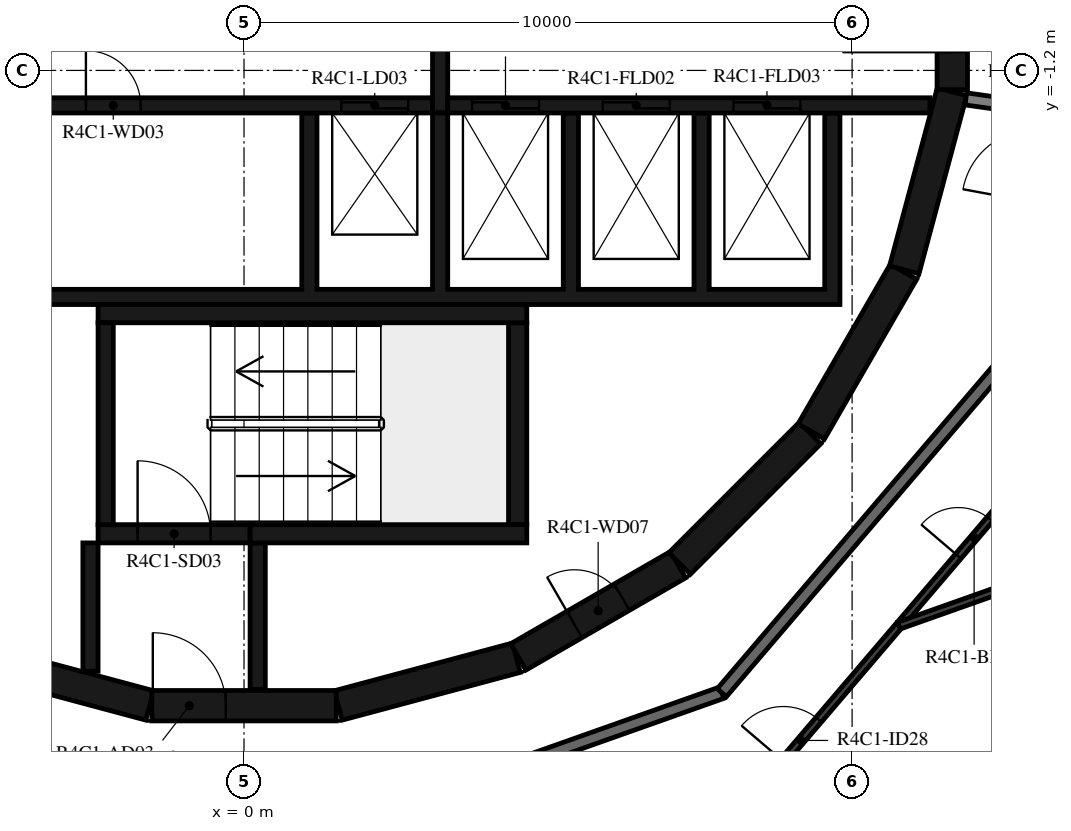
"""IFC4 building model, lengths in metres.
Left out: names, types, materials, properties, quantities, classifications, styles, units other than length and angle.
Written with IfcOpenShell. Run it as: python <this file> out.ifc"""

import sys

from ifc_helpers import new_model, si_unit, direction, frame, frame_2d, origin, place, context, subcontext, project, spatial, polyline, rectangle, outline, extrude, element, fill, save


model = new_model("IFC4")
c1 = context("Model", 3, precision=1e-05, world=origin(), true_north=direction((0.0, 1.0)))
c2 = subcontext(c1, "Body", "Model", "MODEL_VIEW")
j1 = project(units=[si_unit("LENGTHUNIT", "METRE"), si_unit("PLANEANGLEUNIT", "RADIAN")], contexts=[c1])
p1 = place(None, origin())
s1 = spatial("IfcSite", under=j1, at=p1, CompositionType="ELEMENT")
p2 = place(p1, origin())
s2 = spatial("IfcBuilding", under=s1, at=p2, CompositionType="ELEMENT")
p3 = place(p2, frame((0.0, 0.0, 176.2)))
s3 = spatial("IfcBuildingStorey", under=s2, at=p3, CompositionType="ELEMENT", Elevation=176.2)
p4 = place(p3, frame((1.55, -11.643, 0.0), z_axis=(0.0, 0.0, 1.0), x_axis=(0.965948410781, 0.258734743916, 0.0)))
e1 = element("IfcWall", 1, at=p4, inside=s3, PredefinedType="SHEAR", context=c2, shape_type="SweptSolid", body=[
    extrude(rectangle(XDim=3.033, YDim=0.5, at=frame_2d((1.516, 0.0))), origin(), (0.0, 0.0, 1.0), 3.12),
])
p5 = place(p3, frame((4.51, -10.845, 0.0), z_axis=(0.0, 0.0, 1.0), x_axis=(0.865975092491, 0.500087131594, 0.0)))
e2 = element("IfcWall", 2, at=p5, inside=s3, PredefinedType="SHEAR", context=c2, shape_type="SweptSolid", body=[
    extrude(rectangle(XDim=3.033, YDim=0.5, at=frame_2d((1.516, 0.0))), origin(), (0.0, 0.0, 1.0), 3.12),
])
p6 = place(p5, frame((1.066, 0.0, 0.0)))
e3 = element("IfcOpeningElement", 3, at=p6, cuts=e2, PredefinedType="OPENING", context=c2, shape_type="SweptSolid", body=[
    extrude(rectangle(XDim=0.9, YDim=2.1, at=frame_2d((0.45, 1.05))), frame((0.0, 0.26, 0.0), z_axis=(0.0, -1.0, 0.0), x_axis=(1.0, 0.0, 0.0)), (0.0, 0.0, 1.0), 0.52),
])
p7 = place(p3, frame((7.164, -9.308, 0.0), z_axis=(0.0, 0.0, 1.0), x_axis=(0.707106781187, 0.707106781187, 0.0)))
e4 = element("IfcWall", 4, at=p7, inside=s3, PredefinedType="SHEAR", context=c2, shape_type="SweptSolid", body=[
    extrude(rectangle(XDim=3.032, YDim=0.5, at=frame_2d((1.516, 0.0))), origin(), (0.0, 0.0, 1.0), 3.12),
])
for number, where, z_axis, x_axis in (
    (5, (9.329, -7.137, 0.0), (0.0, 0.0, 1.0), (0.5, 0.866, 0.0)),
    (6, (10.858, -4.479, 0.0), (0.0, 0.0, 1.0), (0.259, 0.966, 0.0)),
):
    element("IfcWall", number, at=place(p3, frame(where, z_axis=z_axis, x_axis=x_axis)), inside=s3, PredefinedType="SHEAR", context=c2, shape_type="SweptSolid", body=[
        extrude(rectangle(XDim=3.033, YDim=0.5, at=frame_2d((1.516, 0.0))), origin(), (0.0, 0.0, 1.0), 3.12),
    ])
p8 = place(p3, frame((11.647, -1.516, 0.0), z_axis=(0.0, 0.0, 1.0), x_axis=(0.0, 1.0, 0.0)))
e7 = element("IfcWall", 7, at=p8, inside=s3, PredefinedType="SHEAR", context=c2, shape_type="SweptSolid", body=[
    extrude(rectangle(XDim=3.033, YDim=0.5, at=frame_2d((1.516, 0.0))), origin(), (0.0, 0.0, 1.0), 3.12),
])
p9 = place(p8, frame((0.616, 0.0, 0.0)))
e8 = element("IfcOpeningElement", 8, at=p9, cuts=e7, PredefinedType="OPENING", context=c2, shape_type="SweptSolid", body=[
    extrude(rectangle(XDim=1.8, YDim=2.1, at=frame_2d((0.9, 1.05))), frame((0.0, 0.26, 0.0), z_axis=(0.0, -1.0, 0.0), x_axis=(1.0, 0.0, 0.0)), (0.0, 0.0, 1.0), 0.52),
])
p10 = place(p3, frame((-4.479, -10.858, 0.0), z_axis=(0.0, 0.0, 1.0), x_axis=(0.965948410781, -0.258734743916, 0.0)))
e9 = element("IfcWall", 9, at=p10, inside=s3, PredefinedType="SHEAR", context=c2, shape_type="SweptSolid", body=[
    extrude(rectangle(XDim=3.033, YDim=0.5, at=frame_2d((1.516, 0.0))), origin(), (0.0, 0.0, 1.0), 3.12),
])
p11 = place(p3, frame((-1.516, -11.647, 0.0), z_axis=(0.0, 0.0, 1.0), x_axis=(1.0, 0.0, 0.0)))
e10 = element("IfcWall", 10, at=p11, inside=s3, PredefinedType="SHEAR", context=c2, shape_type="SweptSolid", body=[
    extrude(rectangle(XDim=3.033, YDim=0.5, at=frame_2d((1.516, 0.0))), origin(), (0.0, 0.0, 1.0), 3.12),
])
p12 = place(p11, frame((0.016, 0.0, 0.0)))
e11 = element("IfcOpeningElement", 11, at=p12, cuts=e10, PredefinedType="OPENING", context=c2, shape_type="SweptSolid", body=[
    extrude(rectangle(XDim=1.2, YDim=2.1, at=frame_2d((0.6, 1.05))), frame((0.0, 0.26, 0.0), z_axis=(0.0, -1.0, 0.0), x_axis=(1.0, 0.0, 0.0)), (0.0, 0.0, 1.0), 0.52),
])
p13 = place(p3, frame((-2.275, -8.67, 0.0), z_axis=(0.0, 0.0, 1.0), x_axis=(0.0, 1.0, 0.0)))
e12 = element("IfcWall", 12, at=p13, inside=s3, PredefinedType="SHEAR", context=c2, shape_type="SweptSolid", body=[
    extrude(rectangle(XDim=3.32, YDim=0.25, at=frame_2d((1.66, 0.0))), origin(), (0.0, 0.0, 1.0), 3.12),
])
p14 = place(p3, frame((-2.4, -5.2, 0.0), z_axis=(0.0, 0.0, 1.0), x_axis=(1.0, 0.0, 0.0)))
e13 = element("IfcWall", 13, at=p14, inside=s3, PredefinedType="SHEAR", context=c2, shape_type="SweptSolid", body=[
    extrude(rectangle(XDim=7.05, YDim=0.3, at=frame_2d((3.525, 0.0))), origin(), (0.0, 0.0, 1.0), 3.12),
])
p15 = place(p3, frame((4.5, -8.67, 0.0), z_axis=(0.0, 0.0, 1.0), x_axis=(0.0, 1.0, 0.0)))
e14 = element("IfcWall", 14, at=p15, inside=s3, PredefinedType="SHEAR", context=c2, shape_type="SweptSolid", body=[
    extrude(rectangle(XDim=3.32, YDim=0.3, at=frame_2d((1.66, 0.0))), origin(), (0.0, 0.0, 1.0), 3.12),
])
p16 = place(p3, frame((0.1, -8.82, 0.0), z_axis=(0.0, 0.0, 1.0), x_axis=(1.0, 0.0, 0.0)))
e15 = element("IfcWall", 15, at=p16, inside=s3, PredefinedType="SHEAR", context=c2, shape_type="SweptSolid", body=[
    extrude(rectangle(XDim=4.55, YDim=0.3, at=frame_2d((2.275, 0.0))), origin(), (0.0, 0.0, 1.0), 3.12),
])
p17 = place(p3, frame((-2.4, -8.82, 0.0), z_axis=(0.0, 0.0, 1.0), x_axis=(1.0, 0.0, 0.0)))
e16 = element("IfcWall", 16, at=p17, inside=s3, PredefinedType="SHEAR", context=c2, shape_type="SweptSolid", body=[
    extrude(rectangle(XDim=2.5, YDim=0.3, at=frame_2d((1.25, 0.0))), origin(), (0.0, 0.0, 1.0), 3.12),
])
p18 = place(p17, frame((0.65, 0.0, 0.0)))
e17 = element("IfcOpeningElement", 17, at=p18, cuts=e16, PredefinedType="OPENING", context=c2, shape_type="SweptSolid", body=[
    extrude(rectangle(XDim=1.2, YDim=2.1, at=frame_2d((0.6, 1.05))), frame((0.0, 0.16, 0.0), z_axis=(0.0, -1.0, 0.0), x_axis=(1.0, 0.0, 0.0)), (0.0, 0.0, 1.0), 0.32),
])
p19 = place(p3, frame((-2.525, -8.97, 0.0), z_axis=(0.0, 0.0, 1.0), x_axis=(0.0, -1.0, 0.0)))
e18 = element("IfcWall", 18, at=p19, inside=s3, PredefinedType="SHEAR", context=c2, shape_type="SweptSolid", body=[
    extrude(rectangle(XDim=2.11, YDim=0.25, at=frame_2d((1.055, 0.0))), origin(), (0.0, 0.0, 1.0), 3.12),
])
p20 = place(p3, frame((0.225, -8.97, 0.0), z_axis=(0.0, 0.0, 1.0), x_axis=(0.0, -1.0, 0.0)))
e19 = element("IfcWall", 19, at=p20, inside=s3, PredefinedType="SHEAR", context=c2, shape_type="SweptSolid", body=[
    extrude(rectangle(XDim=2.41, YDim=0.25, at=frame_2d((1.205, 0.0))), origin(), (0.0, 0.0, 1.0), 3.12),
])
p21 = place(p3, origin())
e20 = element("IfcWall", 20, at=p21, inside=s3, PredefinedType="SHEAR", context=c2, shape_type="SweptSolid", body=[
    extrude(outline(polyline([(9.8, -5.05), (9.8, -4.8), (9.8, -1.9), (9.55, -1.9), (9.55, -4.8), (7.65, -4.8), (7.65, -1.9), (7.4, -1.9), (7.4, -4.8), (5.5, -4.8), (5.5, -1.9), (5.25, -1.9), (5.25, -4.8), (3.35, -4.8), (3.35, -1.9), (3.1, -1.9), (3.1, -4.8), (1.2, -4.8), (1.2, -1.9), (0.95, -1.9), (0.95, -4.8), (-5.25, -4.8), (-5.25, -1.9), (-5.5, -1.9), (-5.5, -4.8), (-7.4, -4.8), (-7.4, -1.9), (-7.65, -1.9), (-7.65, -4.8), (-9.55, -4.8), (-9.55, -1.9), (-9.8, -1.9), (-9.8, -4.8), (-9.8, -5.05), (9.8, -5.05)])), origin(), (0.0, 0.0, 1.0), 3.12),
])
p22 = place(p3, frame((-11.28, -1.775, 0.0), z_axis=(0.0, 0.0, 1.0), x_axis=(1.0, 0.0, 0.0)))
e21 = element("IfcWall", 21, at=p22, inside=s3, PredefinedType="SHEAR", context=c2, shape_type="SweptSolid", body=[
    extrude(rectangle(XDim=14.38, YDim=0.25, at=frame_2d((7.19, 0.0))), origin(), (0.0, 0.0, 1.0), 3.12),
])
p23 = place(p22, frame((12.88, 0.0, 0.0)))
e22 = element("IfcOpeningElement", 22, at=p23, cuts=e21, PredefinedType="OPENING", context=c2, shape_type="SweptSolid", body=[
    extrude(rectangle(XDim=1.1, YDim=2.1, at=frame_2d((0.55, 1.05))), frame((0.0, 0.135, 0.0), z_axis=(0.0, -1.0, 0.0), x_axis=(1.0, 0.0, 0.0)), (0.0, 0.0, 1.0), 0.27),
])
p24 = place(p22, frame((8.68, 0.0, 0.0)))
e23 = element("IfcOpeningElement", 23, at=p24, cuts=e21, PredefinedType="OPENING", context=c2, shape_type="SweptSolid", body=[
    extrude(rectangle(XDim=0.9, YDim=2.1, at=frame_2d((0.45, 1.05))), frame((0.0, 0.135, 0.0), z_axis=(0.0, -1.0, 0.0), x_axis=(1.0, 0.0, 0.0)), (0.0, 0.0, 1.0), 0.27),
])
p25 = place(p3, frame((3.35, -1.775, 0.0), z_axis=(0.0, 0.0, 1.0), x_axis=(1.0, 0.0, 0.0)))
e24 = element("IfcWall", 24, at=p25, inside=s3, PredefinedType="SHEAR", context=c2, shape_type="SweptSolid", body=[
    extrude(rectangle(XDim=7.93, YDim=0.25, at=frame_2d((3.965, 0.0))), origin(), (0.0, 0.0, 1.0), 3.12),
])
p26 = place(p25, frame((0.4, 0.0, 0.0)))
e25 = element("IfcOpeningElement", 25, at=p26, cuts=e24, PredefinedType="OPENING", context=c2, shape_type="SweptSolid", body=[
    extrude(rectangle(XDim=1.1, YDim=2.4, at=frame_2d((0.55, 1.2))), frame((0.0, 0.135, 0.0), z_axis=(0.0, -1.0, 0.0), x_axis=(1.0, 0.0, 0.0)), (0.0, 0.0, 1.0), 0.27),
])
p27 = place(p25, frame((2.55, 0.0, 0.0)))
e26 = element("IfcOpeningElement", 26, at=p27, cuts=e24, PredefinedType="OPENING", context=c2, shape_type="SweptSolid", body=[
    extrude(rectangle(XDim=1.1, YDim=2.4, at=frame_2d((0.55, 1.2))), frame((0.0, 0.135, 0.0), z_axis=(0.0, -1.0, 0.0), x_axis=(1.0, 0.0, 0.0)), (0.0, 0.0, 1.0), 0.27),
])
p28 = place(p25, frame((4.7, 0.0, 0.0)))
e27 = element("IfcOpeningElement", 27, at=p28, cuts=e24, PredefinedType="OPENING", context=c2, shape_type="SweptSolid", body=[
    extrude(rectangle(XDim=1.1, YDim=2.4, at=frame_2d((0.55, 1.2))), frame((0.0, 0.135, 0.0), z_axis=(0.0, -1.0, 0.0), x_axis=(1.0, 0.0, 0.0)), (0.0, 0.0, 1.0), 0.27),
])
p29 = place(p3, frame((3.225, -1.9, 0.0), z_axis=(0.0, 0.0, 1.0), x_axis=(0.0, 1.0, 0.0)))
e28 = element("IfcWall", 28, at=p29, inside=s3, PredefinedType="SHEAR", context=c2, shape_type="SweptSolid", body=[
    extrude(rectangle(XDim=3.8, YDim=0.25, at=frame_2d((1.9, 0.0))), origin(), (0.0, 0.0, 1.0), 3.12),
])
p30 = place(p3, frame((13.282, -1.867, 0.0), z_axis=(0.0, 0.0, 1.0), x_axis=(-0.990265430288, 0.139191873241, 0.0)))
e29 = element("IfcWall", 29, at=p30, inside=s3, PredefinedType="STANDARD", context=c2, shape_type="SweptSolid", body=[
    extrude(rectangle(XDim=1.426, YDim=0.2, at=frame_2d((0.713, 0.0))), origin(), (0.0, 0.0, 1.0), 3.12),
])
p31 = place(p3, frame((1.088, -13.83, 0.0), z_axis=(0.0, 0.0, 1.0), x_axis=(0.942648397945, 0.333787354241, 0.0)))
e30 = element("IfcWall", 30, at=p31, inside=s3, PredefinedType="STANDARD", context=c2, shape_type="SweptSolid", body=[
    extrude(rectangle(XDim=7.181, YDim=0.2, at=frame_2d((3.591, 0.0))), origin(), (0.0, 0.0, 1.0), 3.12),
])
p32 = place(p31, frame((0.2, 0.0, 0.0)))
e31 = element("IfcOpeningElement", 31, at=p32, cuts=e30, PredefinedType="OPENING", context=c2, shape_type="SweptSolid", body=[
    extrude(rectangle(XDim=1.0, YDim=2.1, at=frame_2d((0.5, 1.05))), frame((0.0, 0.11, 0.0), z_axis=(0.0, -1.0, 0.0), x_axis=(1.0, 0.0, 0.0)), (0.0, 0.0, 1.0), 0.22),
])
p33 = place(p3, frame((7.858, -11.433, 0.0), z_axis=(0.0, 0.0, 1.0), x_axis=(0.649440801937, 0.760412154545, 0.0)))
e32 = element("IfcWall", 32, at=p33, inside=s3, PredefinedType="STANDARD", context=c2, shape_type="SweptSolid", body=[
    extrude(rectangle(XDim=7.181, YDim=0.2, at=frame_2d((3.59, 0.0))), origin(), (0.0, 0.0, 1.0), 3.12),
])
p34 = place(p3, frame((8.737, -12.713, 0.0), z_axis=(0.0, 0.0, 1.0), x_axis=(0.649427973074, 0.760423111031, 0.0)))
e33 = element("IfcWall", 33, at=p34, inside=s3, PredefinedType="PARTITIONING", context=c2, shape_type="SweptSolid", body=[
    extrude(rectangle(XDim=7.571, YDim=0.12, at=frame_2d((3.785, 0.0))), origin(), (0.0, 0.0, 1.0), 3.12),
])
p35 = place(p34, frame((0.2, 0.0, 0.0)))
e34 = element("IfcOpeningElement", 34, at=p35, cuts=e33, PredefinedType="OPENING", context=c2, shape_type="SweptSolid", body=[
    extrude(rectangle(XDim=0.9, YDim=2.1, at=frame_2d((0.45, 1.05))), frame((0.0, 0.07, 0.0), z_axis=(0.0, -1.0, 0.0), x_axis=(1.0, 0.0, 0.0)), (0.0, 0.0, 1.0), 0.14),
])
p36 = place(p34, frame((4.634, 0.0, 0.0)))
e35 = element("IfcOpeningElement", 35, at=p36, cuts=e33, PredefinedType="OPENING", context=c2, shape_type="SweptSolid", body=[
    extrude(rectangle(XDim=0.8, YDim=2.1, at=frame_2d((0.4, 1.05))), frame((0.0, 0.07, 0.0), z_axis=(0.0, -1.0, 0.0), x_axis=(1.0, 0.0, 0.0)), (0.0, 0.0, 1.0), 0.14),
])
p37 = place(p3, frame((21.362, -6.58, 0.0), z_axis=(0.0, 0.0, 1.0), x_axis=(-0.942647598157, -0.333789612913, 0.0)))
e36 = element("IfcWall", 36, at=p37, inside=s3, PredefinedType="PARTITIONING", context=c2, shape_type="SweptSolid", body=[
    extrude(rectangle(XDim=11.234, YDim=0.12, at=frame_2d((5.617, 0.0))), origin(), (0.0, 0.0, 1.0), 3.12),
])
p38 = place(p18, origin())
e37 = element("IfcDoor", 37, at=p38, inside=s3, OperationType="SINGLE_SWING_LEFT", PredefinedType="DOOR", context=c2, shape_type="SweptSolid", body=[
    extrude(rectangle(XDim=1.2, YDim=2.1, at=frame_2d((0.6, 1.05))), frame((0.0, 0.025, 0.0), z_axis=(0.0, -1.0, 0.0), x_axis=(1.0, 0.0, 0.0)), (0.0, 0.0, 1.0), 0.05),
])
fill(e17, e37)
p39 = place(p12, origin())
e38 = element("IfcDoor", 38, at=p39, inside=s3, OperationType="SINGLE_SWING_RIGHT", PredefinedType="DOOR", context=c2, shape_type="SweptSolid", body=[
    extrude(rectangle(XDim=1.2, YDim=2.1, at=frame_2d((0.6, 1.05))), frame((0.0, 0.025, 0.0), z_axis=(0.0, -1.0, 0.0), x_axis=(1.0, 0.0, 0.0)), (0.0, 0.0, 1.0), 0.05),
])
fill(e11, e38)
p40 = place(p9, origin())
e39 = element("IfcDoor", 39, at=p40, inside=s3, OperationType="DOUBLE_DOOR_SINGLE_SWING", PredefinedType="DOOR", context=c2, shape_type="SweptSolid", body=[
    extrude(rectangle(XDim=1.8, YDim=2.1, at=frame_2d((0.9, 1.05))), frame((0.0, 0.025, 0.0), z_axis=(0.0, -1.0, 0.0), x_axis=(1.0, 0.0, 0.0)), (0.0, 0.0, 1.0), 0.05),
])
fill(e8, e39)
p41 = place(p23, origin())
e40 = element("IfcDoor", 40, at=p41, inside=s3, OperationType="DOUBLE_DOOR_SLIDING", PredefinedType="DOOR", context=c2, shape_type="SweptSolid", body=[
    extrude(rectangle(XDim=1.1, YDim=2.1, at=frame_2d((0.55, 1.05))), frame((0.0, 0.025, 0.0), z_axis=(0.0, -1.0, 0.0), x_axis=(1.0, 0.0, 0.0)), (0.0, 0.0, 1.0), 0.05),
])
fill(e22, e40)
p42 = place(p26, origin())
e41 = element("IfcDoor", 41, at=p42, inside=s3, OperationType="DOUBLE_DOOR_SLIDING", PredefinedType="DOOR", context=c2, shape_type="SweptSolid", body=[
    extrude(rectangle(XDim=1.1, YDim=2.4, at=frame_2d((0.55, 1.2))), frame((0.0, 0.025, 0.0), z_axis=(0.0, -1.0, 0.0), x_axis=(1.0, 0.0, 0.0)), (0.0, 0.0, 1.0), 0.05),
])
fill(e25, e41)
p43 = place(p27, origin())
e42 = element("IfcDoor", 42, at=p43, inside=s3, OperationType="DOUBLE_DOOR_SLIDING", PredefinedType="DOOR", context=c2, shape_type="SweptSolid", body=[
    extrude(rectangle(XDim=1.1, YDim=2.4, at=frame_2d((0.55, 1.2))), frame((0.0, 0.025, 0.0), z_axis=(0.0, -1.0, 0.0), x_axis=(1.0, 0.0, 0.0)), (0.0, 0.0, 1.0), 0.05),
])
fill(e26, e42)
p44 = place(p28, origin())
e43 = element("IfcDoor", 43, at=p44, inside=s3, OperationType="DOUBLE_DOOR_SLIDING", PredefinedType="DOOR", context=c2, shape_type="SweptSolid", body=[
    extrude(rectangle(XDim=1.1, YDim=2.4, at=frame_2d((0.55, 1.2))), frame((0.0, 0.025, 0.0), z_axis=(0.0, -1.0, 0.0), x_axis=(1.0, 0.0, 0.0)), (0.0, 0.0, 1.0), 0.05),
])
fill(e27, e43)
p45 = place(p24, origin())
e44 = element("IfcDoor", 44, at=p45, inside=s3, OperationType="SINGLE_SWING_LEFT", PredefinedType="DOOR", context=c2, shape_type="SweptSolid", body=[
    extrude(rectangle(XDim=0.9, YDim=2.1, at=frame_2d((0.45, 1.05))), frame((0.0, 0.025, 0.0), z_axis=(0.0, -1.0, 0.0), x_axis=(1.0, 0.0, 0.0)), (0.0, 0.0, 1.0), 0.05),
])
fill(e23, e44)
p46 = place(p6, origin())
e45 = element("IfcDoor", 45, at=p46, inside=s3, OperationType="SINGLE_SWING_LEFT", PredefinedType="DOOR", context=c2, shape_type="SweptSolid", body=[
    extrude(rectangle(XDim=0.9, YDim=2.1, at=frame_2d((0.45, 1.05))), frame((0.0, 0.025, 0.0), z_axis=(0.0, -1.0, 0.0), x_axis=(1.0, 0.0, 0.0)), (0.0, 0.0, 1.0), 0.05),
])
fill(e3, e45)
p47 = place(p35, origin())
e46 = element("IfcDoor", 46, at=p47, inside=s3, OperationType="SINGLE_SWING_RIGHT", PredefinedType="DOOR", context=c2, shape_type="SweptSolid", body=[
    extrude(rectangle(XDim=0.9, YDim=2.1, at=frame_2d((0.45, 1.05))), frame((0.0, 0.025, 0.0), z_axis=(0.0, -1.0, 0.0), x_axis=(1.0, 0.0, 0.0)), (0.0, 0.0, 1.0), 0.05),
])
fill(e34, e46)
p48 = place(p36, origin())
e47 = element("IfcDoor", 47, at=p48, inside=s3, OperationType="SINGLE_SWING_RIGHT", PredefinedType="DOOR", context=c2, shape_type="SweptSolid", body=[
    extrude(rectangle(XDim=0.8, YDim=2.1, at=frame_2d((0.4, 1.05))), frame((0.0, 0.025, 0.0), z_axis=(0.0, -1.0, 0.0), x_axis=(1.0, 0.0, 0.0)), (0.0, 0.0, 1.0), 0.05),
])
fill(e35, e47)
save(model, sys.argv[1])
